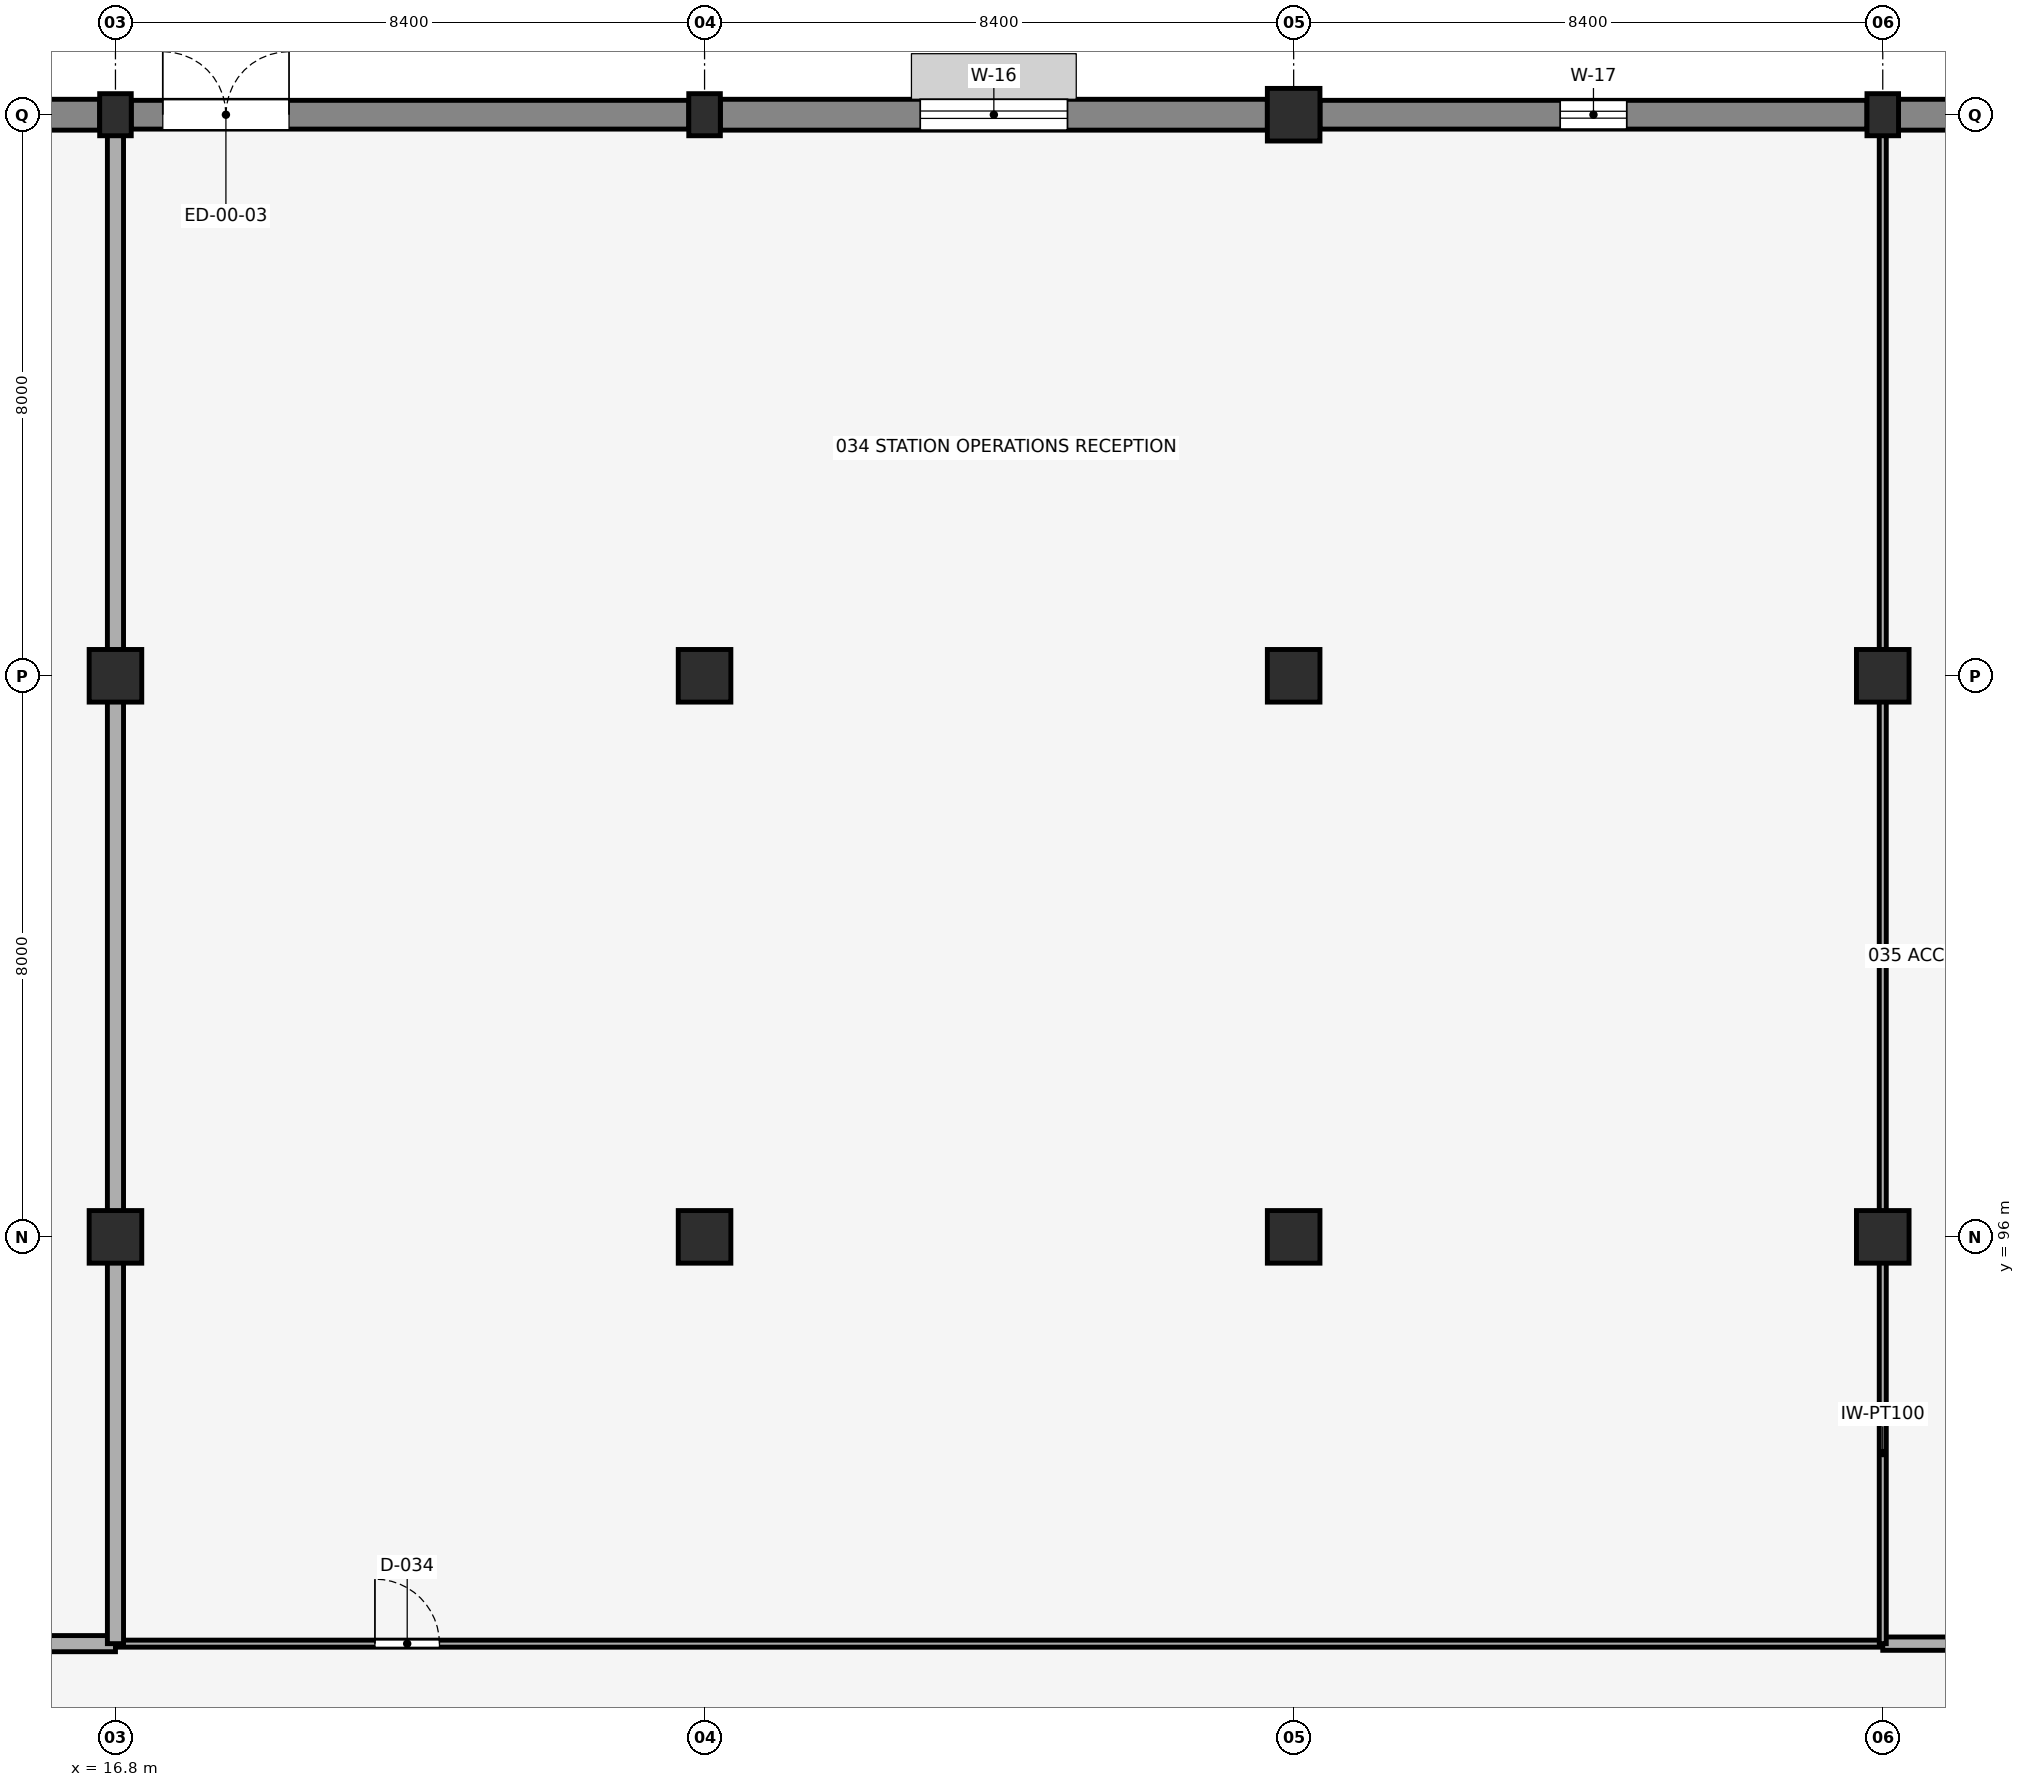
"""IFC4 building model, lengths in metres.
Left out: names, types, materials, properties, quantities, classifications, styles, units other than length and angle.
Written with IfcOpenShell. Run it as: python <this file> out.ifc"""

import sys

from ifc_helpers import new_model, si_unit, direction, frame, frame_2d, origin, origin_2d, place, context, subcontext, project, spatial, rectangle, extrude, element, fill, save


model = new_model("IFC4")
c1 = context("Model", 3, precision=1e-05, world=origin(), true_north=direction((0.0, 1.0)))
c2 = subcontext(c1, "Body", "Model", "MODEL_VIEW")
j1 = project(units=[si_unit("LENGTHUNIT", "METRE"), si_unit("PLANEANGLEUNIT", "RADIAN")], contexts=[c1])
p1 = place(None, origin())
s1 = spatial("IfcSite", under=j1, at=p1, CompositionType="ELEMENT")
p2 = place(p1, origin())
s2 = spatial("IfcBuilding", under=s1, at=p2, CompositionType="ELEMENT")
p3 = place(p2, origin())
s3 = spatial("IfcBuildingStorey", under=s2, at=p3, CompositionType="ELEMENT", Elevation=0.0)
for number, where, z_axis, x_axis in (
    (1, (16.8, 96.0, 0.0), (0.0, 0.0, 1.0), (1.0, 0.0, 0.0)),
    (2, (16.8, 104.0, 0.0), (0.0, 0.0, 1.0), (1.0, 0.0, 0.0)),
):
    element("IfcColumn", number, at=place(p3, frame(where, z_axis=z_axis, x_axis=x_axis)), inside=s3, PredefinedType="COLUMN", context=c2, shape_type="SweptSolid", body=[
        extrude(rectangle(XDim=0.75, YDim=0.75, at=origin_2d()), origin(), (0.0, 0.0, 1.0), 5.15),
    ])
p4 = place(p3, frame((16.8, 112.0, 0.0), z_axis=(0.0, 0.0, 1.0), x_axis=(1.0, 0.0, 0.0)))
e3 = element("IfcColumn", 3, at=p4, inside=s3, PredefinedType="PILASTER", context=c2, shape_type="SweptSolid", body=[
    extrude(rectangle(XDim=0.45, YDim=0.6, at=origin_2d()), origin(), (0.0, 0.0, 1.0), 5.15),
])
for number, where, z_axis, x_axis in (
    (4, (25.2, 96.0, 0.0), (0.0, 0.0, 1.0), (1.0, 0.0, 0.0)),
    (5, (25.2, 104.0, 0.0), (0.0, 0.0, 1.0), (1.0, 0.0, 0.0)),
):
    element("IfcColumn", number, at=place(p3, frame(where, z_axis=z_axis, x_axis=x_axis)), inside=s3, PredefinedType="COLUMN", context=c2, shape_type="SweptSolid", body=[
        extrude(rectangle(XDim=0.75, YDim=0.75, at=origin_2d()), origin(), (0.0, 0.0, 1.0), 5.15),
    ])
p5 = place(p3, frame((25.2, 112.0, 0.0), z_axis=(0.0, 0.0, 1.0), x_axis=(1.0, 0.0, 0.0)))
e6 = element("IfcColumn", 6, at=p5, inside=s3, PredefinedType="PILASTER", context=c2, shape_type="SweptSolid", body=[
    extrude(rectangle(XDim=0.45, YDim=0.6, at=origin_2d()), origin(), (0.0, 0.0, 1.0), 5.15),
])
for number, where, z_axis, x_axis in (
    (7, (33.6, 96.0, 0.0), (0.0, 0.0, 1.0), (1.0, 0.0, 0.0)),
    (8, (33.6, 104.0, 0.0), (0.0, 0.0, 1.0), (1.0, 0.0, 0.0)),
    (9, (33.6, 112.0, 0.0), (0.0, 0.0, 1.0), (1.0, 0.0, 0.0)),
    (10, (42.0, 96.0, 0.0), (0.0, 0.0, 1.0), (1.0, 0.0, 0.0)),
    (11, (42.0, 104.0, 0.0), (0.0, 0.0, 1.0), (1.0, 0.0, 0.0)),
):
    element("IfcColumn", number, at=place(p3, frame(where, z_axis=z_axis, x_axis=x_axis)), inside=s3, PredefinedType="COLUMN", context=c2, shape_type="SweptSolid", body=[
        extrude(rectangle(XDim=0.75, YDim=0.75, at=origin_2d()), origin(), (0.0, 0.0, 1.0), 5.15),
    ])
p6 = place(p3, frame((42.0, 112.0, 0.0), z_axis=(0.0, 0.0, 1.0), x_axis=(1.0, 0.0, 0.0)))
e12 = element("IfcColumn", 12, at=p6, inside=s3, PredefinedType="PILASTER", context=c2, shape_type="SweptSolid", body=[
    extrude(rectangle(XDim=0.45, YDim=0.6, at=origin_2d()), origin(), (0.0, 0.0, 1.0), 5.15),
])
p7 = place(p3, frame((8.625, 112.0, 0.0), z_axis=(0.0, 0.0, 1.0), x_axis=(1.0, 0.0, 0.0)))
e13 = element("IfcWall", 13, at=p7, inside=s3, PredefinedType="SOLIDWALL", context=c2, shape_type="SweptSolid", body=[
    extrude(rectangle(XDim=7.95, YDim=0.44, at=frame_2d((3.975, 0.0))), origin(), (0.0, 0.0, 1.0), 4.74),
])
p8 = place(p7, frame((2.675, 0.0, 1.55), z_axis=(0.0, 0.0, 1.0), x_axis=(1.0, 0.0, 0.0)))
e14 = element("IfcOpeningElement", 14, at=p8, cuts=e13, PredefinedType="OPENING", context=c2, shape_type="SweptSolid", body=[
    extrude(rectangle(XDim=2.6, YDim=0.85, at=frame_2d((1.3, 0.425))), frame((0.0, 0.23, 0.0), z_axis=(0.0, -1.0, 0.0), x_axis=(1.0, 0.0, 0.0)), (0.0, 0.0, 1.0), 0.46),
])
p9 = place(p3, frame((17.025, 112.0, 0.0), z_axis=(0.0, 0.0, 1.0), x_axis=(1.0, 0.0, 0.0)))
e15 = element("IfcWall", 15, at=p9, inside=s3, PredefinedType="SOLIDWALL", context=c2, shape_type="SweptSolid", body=[
    extrude(rectangle(XDim=7.95, YDim=0.41, at=frame_2d((3.975, 0.0))), origin(), (0.0, 0.0, 1.0), 4.74),
])
p10 = place(p9, frame((0.45, 0.0, 0.0), z_axis=(0.0, 0.0, 1.0), x_axis=(1.0, 0.0, 0.0)))
e16 = element("IfcOpeningElement", 16, at=p10, cuts=e15, PredefinedType="OPENING", context=c2, shape_type="SweptSolid", body=[
    extrude(rectangle(XDim=1.8, YDim=2.2, at=frame_2d((0.9, 1.1))), frame((0.0, 0.215, 0.0), z_axis=(0.0, -1.0, 0.0), x_axis=(1.0, 0.0, 0.0)), (0.0, 0.0, 1.0), 0.43),
])
p11 = place(p3, frame((25.425, 112.0, 0.0), z_axis=(0.0, 0.0, 1.0), x_axis=(1.0, 0.0, 0.0)))
e17 = element("IfcWall", 17, at=p11, inside=s3, PredefinedType="SOLIDWALL", context=c2, shape_type="SweptSolid", body=[
    extrude(rectangle(XDim=7.8, YDim=0.44, at=frame_2d((3.9, 0.0))), origin(), (0.0, 0.0, 1.0), 4.74),
])
p12 = place(p11, frame((2.85, 0.0, 1.55), z_axis=(0.0, 0.0, 1.0), x_axis=(1.0, 0.0, 0.0)))
e18 = element("IfcOpeningElement", 18, at=p12, cuts=e17, PredefinedType="OPENING", context=c2, shape_type="SweptSolid", body=[
    extrude(rectangle(XDim=2.1, YDim=0.8, at=frame_2d((1.05, 0.4))), frame((0.0, 0.23, 0.0), z_axis=(0.0, -1.0, 0.0), x_axis=(1.0, 0.0, 0.0)), (0.0, 0.0, 1.0), 0.46),
])
p13 = place(p3, frame((33.975, 112.0, 0.0), z_axis=(0.0, 0.0, 1.0), x_axis=(1.0, 0.0, 0.0)))
e19 = element("IfcWall", 19, at=p13, inside=s3, PredefinedType="SOLIDWALL", context=c2, shape_type="SweptSolid", body=[
    extrude(rectangle(XDim=7.8, YDim=0.41, at=frame_2d((3.9, 0.0))), origin(), (0.0, 0.0, 1.0), 4.74),
])
p14 = place(p13, frame((3.425, 0.0, 0.65), z_axis=(0.0, 0.0, 1.0), x_axis=(1.0, 0.0, 0.0)))
e20 = element("IfcOpeningElement", 20, at=p14, cuts=e19, PredefinedType="OPENING", context=c2, shape_type="SweptSolid", body=[
    extrude(rectangle(XDim=0.95, YDim=2.1, at=frame_2d((0.475, 1.05))), frame((0.0, 0.215, 0.0), z_axis=(0.0, -1.0, 0.0), x_axis=(1.0, 0.0, 0.0)), (0.0, 0.0, 1.0), 0.43),
])
p15 = place(p3, frame((42.225, 112.0, 0.0), z_axis=(0.0, 0.0, 1.0), x_axis=(1.0, 0.0, 0.0)))
e21 = element("IfcWall", 21, at=p15, inside=s3, PredefinedType="SOLIDWALL", context=c2, shape_type="SweptSolid", body=[
    extrude(rectangle(XDim=7.8, YDim=0.44, at=frame_2d((3.9, 0.0))), origin(), (0.0, 0.0, 1.0), 4.74),
])
p16 = place(p15, frame((3.5, 0.0, 0.65), z_axis=(0.0, 0.0, 1.0), x_axis=(1.0, 0.0, 0.0)))
e22 = element("IfcOpeningElement", 22, at=p16, cuts=e21, PredefinedType="OPENING", context=c2, shape_type="SweptSolid", body=[
    extrude(rectangle(XDim=0.8, YDim=1.85, at=frame_2d((0.4, 0.925))), frame((0.0, 0.23, 0.0), z_axis=(0.0, -1.0, 0.0), x_axis=(1.0, 0.0, 0.0)), (0.0, 0.0, 1.0), 0.46),
])
p17 = place(p3, frame((8.4, 90.2, 0.0), z_axis=(0.0, 0.0, 1.0), x_axis=(1.0, 0.0, 0.0)))
e23 = element("IfcWall", 23, at=p17, inside=s3, PredefinedType="PARTITIONING", context=c2, shape_type="SweptSolid", body=[
    extrude(rectangle(XDim=8.4, YDim=0.23, at=frame_2d((4.2, 0.0))), origin(), (0.0, 0.0, 1.0), 5.15),
])
p18 = place(p17, frame((3.7, 0.0, 0.0), z_axis=(0.0, 0.0, 1.0), x_axis=(1.0, 0.0, 0.0)))
e24 = element("IfcOpeningElement", 24, at=p18, cuts=e23, PredefinedType="OPENING", context=c2, shape_type="SweptSolid", body=[
    extrude(rectangle(XDim=1.0, YDim=2.15, at=frame_2d((0.5, 1.075))), frame((0.0, 0.125, 0.0), z_axis=(0.0, -1.0, 0.0), x_axis=(1.0, 0.0, 0.0)), (0.0, 0.0, 1.0), 0.25),
])
p19 = place(p3, frame((16.8, 90.2, 0.0), z_axis=(0.0, 0.0, 1.0), x_axis=(1.0, 0.0, 0.0)))
e25 = element("IfcWall", 25, at=p19, inside=s3, PredefinedType="PARTITIONING", context=c2, shape_type="SweptSolid", body=[
    extrude(rectangle(XDim=25.2, YDim=0.1, at=frame_2d((12.6, 0.0))), origin(), (0.0, 0.0, 1.0), 4.542),
])
p20 = place(p19, frame((3.7, 0.0, 0.0), z_axis=(0.0, 0.0, 1.0), x_axis=(1.0, 0.0, 0.0)))
e26 = element("IfcOpeningElement", 26, at=p20, cuts=e25, PredefinedType="OPENING", context=c2, shape_type="SweptSolid", body=[
    extrude(rectangle(XDim=0.92, YDim=2.12, at=frame_2d((0.46, 1.06))), frame((0.0, 0.06, 0.0), z_axis=(0.0, -1.0, 0.0), x_axis=(1.0, 0.0, 0.0)), (0.0, 0.0, 1.0), 0.12),
])
p21 = place(p3, frame((42.0, 90.2, 0.0), z_axis=(0.0, 0.0, 1.0), x_axis=(1.0, 0.0, 0.0)))
e27 = element("IfcWall", 27, at=p21, inside=s3, PredefinedType="PLUMBINGWALL", context=c2, shape_type="SweptSolid", body=[
    extrude(rectangle(XDim=3.6, YDim=0.19, at=frame_2d((1.8, 0.0))), origin(), (0.0, 0.0, 1.0), 5.15),
])
p22 = place(p21, frame((1.3, 0.0, 0.0), z_axis=(0.0, 0.0, 1.0), x_axis=(1.0, 0.0, 0.0)))
e28 = element("IfcOpeningElement", 28, at=p22, cuts=e27, PredefinedType="OPENING", context=c2, shape_type="SweptSolid", body=[
    extrude(rectangle(XDim=0.95, YDim=2.15, at=frame_2d((0.475, 1.075))), frame((0.0, 0.105, 0.0), z_axis=(0.0, -1.0, 0.0), x_axis=(1.0, 0.0, 0.0)), (0.0, 0.0, 1.0), 0.21),
])
p23 = place(p3, frame((16.8, 90.2, 0.0), z_axis=(0.0, 0.0, 1.0), x_axis=(0.0, 1.0, 0.0)))
e29 = element("IfcWall", 29, at=p23, inside=s3, PredefinedType="PARTITIONING", context=c2, shape_type="SweptSolid", body=[
    extrude(rectangle(XDim=5.435, YDim=0.23, at=frame_2d((2.718, 0.0))), origin(), (0.0, 0.0, 1.0), 4.542),
])
p24 = place(p3, frame((16.8, 96.365, 0.0), z_axis=(0.0, 0.0, 1.0), x_axis=(0.0, 1.0, 0.0)))
e30 = element("IfcWall", 30, at=p24, inside=s3, PredefinedType="PARTITIONING", context=c2, shape_type="SweptSolid", body=[
    extrude(rectangle(XDim=7.27, YDim=0.23, at=frame_2d((3.635, 0.0))), origin(), (0.0, 0.0, 1.0), 4.542),
])
p25 = place(p3, frame((16.8, 104.365, 0.0), z_axis=(0.0, 0.0, 1.0), x_axis=(0.0, 1.0, 0.0)))
e31 = element("IfcWall", 31, at=p25, inside=s3, PredefinedType="PARTITIONING", context=c2, shape_type="SweptSolid", body=[
    extrude(rectangle(XDim=7.345, YDim=0.23, at=frame_2d((3.672, 0.0))), origin(), (0.0, 0.0, 1.0), 4.542),
])
p26 = place(p3, frame((42.0, 90.2, 0.0), z_axis=(0.0, 0.0, 1.0), x_axis=(0.0, 1.0, 0.0)))
e32 = element("IfcWall", 32, at=p26, inside=s3, PredefinedType="PARTITIONING", context=c2, shape_type="SweptSolid", body=[
    extrude(rectangle(XDim=5.435, YDim=0.1, at=frame_2d((2.718, 0.0))), origin(), (0.0, 0.0, 1.0), 4.542),
])
p27 = place(p3, frame((42.0, 96.365, 0.0), z_axis=(0.0, 0.0, 1.0), x_axis=(0.0, 1.0, 0.0)))
e33 = element("IfcWall", 33, at=p27, inside=s3, PredefinedType="PARTITIONING", context=c2, shape_type="SweptSolid", body=[
    extrude(rectangle(XDim=7.27, YDim=0.1, at=frame_2d((3.635, 0.0))), origin(), (0.0, 0.0, 1.0), 4.542),
])
p28 = place(p3, frame((42.0, 104.365, 0.0), z_axis=(0.0, 0.0, 1.0), x_axis=(0.0, 1.0, 0.0)))
e34 = element("IfcWall", 34, at=p28, inside=s3, PredefinedType="PARTITIONING", context=c2, shape_type="SweptSolid", body=[
    extrude(rectangle(XDim=7.345, YDim=0.1, at=frame_2d((3.672, 0.0))), origin(), (0.0, 0.0, 1.0), 4.542),
])
p29 = place(p10, origin())
e35 = element("IfcDoor", 35, at=p29, inside=s3, OperationType="DOUBLE_DOOR_SINGLE_SWING", PredefinedType="DOOR", context=c2, shape_type="SweptSolid", body=[
    extrude(rectangle(XDim=1.8, YDim=2.2, at=frame_2d((0.9, 1.1))), frame((0.0, 0.025, 0.0), z_axis=(0.0, -1.0, 0.0), x_axis=(1.0, 0.0, 0.0)), (0.0, 0.0, 1.0), 0.05),
])
fill(e16, e35)
p30 = place(p12, origin())
e36 = element("IfcWindow", 36, at=p30, inside=s3, PartitioningType="DOUBLE_PANEL_HORIZONTAL", PredefinedType="WINDOW", context=c2, shape_type="SweptSolid", body=[
    extrude(rectangle(XDim=2.1, YDim=0.8, at=frame_2d((1.05, 0.4))), frame((0.0, 0.03, 0.0), z_axis=(0.0, -1.0, 0.0), x_axis=(1.0, 0.0, 0.0)), (0.0, 0.0, 1.0), 0.06),
])
fill(e18, e36)
p31 = place(p14, origin())
e37 = element("IfcWindow", 37, at=p31, inside=s3, PartitioningType="SINGLE_PANEL", PredefinedType="WINDOW", context=c2, shape_type="SweptSolid", body=[
    extrude(rectangle(XDim=0.95, YDim=2.1, at=frame_2d((0.475, 1.05))), frame((0.0, 0.03, 0.0), z_axis=(0.0, -1.0, 0.0), x_axis=(1.0, 0.0, 0.0)), (0.0, 0.0, 1.0), 0.06),
])
fill(e20, e37)
p32 = place(p20, origin())
e38 = element("IfcDoor", 38, at=p32, inside=s3, OperationType="SINGLE_SWING_LEFT", PredefinedType="DOOR", context=c2, shape_type="SweptSolid", body=[
    extrude(rectangle(XDim=0.92, YDim=2.12, at=frame_2d((0.46, 1.06))), frame((0.0, 0.025, 0.0), z_axis=(0.0, -1.0, 0.0), x_axis=(1.0, 0.0, 0.0)), (0.0, 0.0, 1.0), 0.05),
])
fill(e26, e38)
save(model, sys.argv[1])
